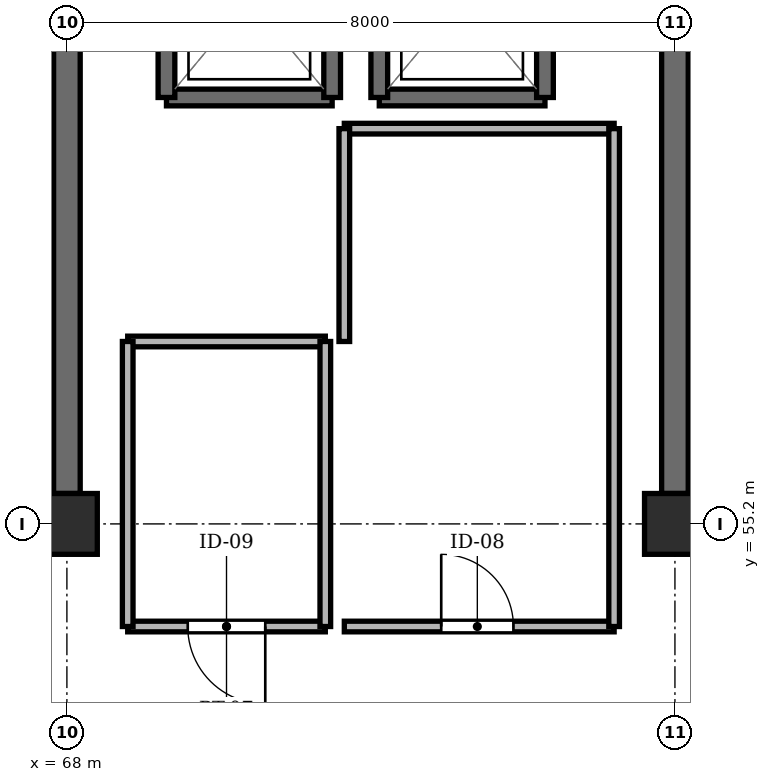
"""IFC4 building model, lengths in metres.
Left out: names, types, materials, properties, quantities, classifications, styles, units other than length and angle.
Written with IfcOpenShell. Run it as: python <this file> out.ifc"""

import sys

from ifc_helpers import new_model, si_unit, direction, frame, frame_2d, origin, origin_2d, place, context, subcontext, project, spatial, rectangle, extrude, element, fill, save


model = new_model("IFC4")
c1 = context("Model", 3, precision=1e-05, world=origin(), true_north=direction((0.0, 1.0)))
c2 = subcontext(c1, "Body", "Model", "MODEL_VIEW")
j1 = project(units=[si_unit("LENGTHUNIT", "METRE"), si_unit("PLANEANGLEUNIT", "RADIAN")], contexts=[c1])
p1 = place(None, origin())
s1 = spatial("IfcSite", under=j1, at=p1, CompositionType="ELEMENT")
p2 = place(p1, origin())
s2 = spatial("IfcBuilding", under=s1, at=p2, CompositionType="ELEMENT")
p3 = place(p2, frame((0.0, 0.0, 63.3)))
s3 = spatial("IfcBuildingStorey", under=s2, at=p3, CompositionType="ELEMENT", Elevation=63.3)
for number, where, z_axis, x_axis in (
    (1, (68.0, 55.2, -0.21), (0.0, 0.0, 1.0), (1.0, 0.0, 0.0)),
    (2, (76.0, 55.2, -0.21), (0.0, 0.0, 1.0), (1.0, 0.0, 0.0)),
):
    element("IfcColumn", number, at=place(p3, frame(where, z_axis=z_axis, x_axis=x_axis)), inside=s3, PredefinedType="COLUMN", context=c2, shape_type="SweptSolid", body=[
        extrude(rectangle(XDim=0.8, YDim=0.8, at=origin_2d()), origin(), (0.0, 0.0, 1.0), 3.22),
    ])
for number, where, z_axis, x_axis in (
    (3, (68.0, 55.6, 0.0), (0.0, 0.0, 1.0), (0.0, 1.0, 0.0)),
    (4, (76.0, 55.6, 0.0), (0.0, 0.0, 1.0), (0.0, 1.0, 0.0)),
):
    element("IfcWall", number, at=place(p3, frame(where, z_axis=z_axis, x_axis=x_axis)), inside=s3, PredefinedType="SHEAR", context=c2, shape_type="SweptSolid", body=[
        extrude(rectangle(XDim=6.5, YDim=0.35, at=frame_2d((3.25, 0.0))), origin(), (0.0, 0.0, 1.0), 3.01),
    ])
p4 = place(p3, frame((69.31, 60.81, 0.0), z_axis=(0.0, 0.0, 1.0), x_axis=(1.0, 0.0, 0.0)))
e5 = element("IfcWall", 5, at=p4, inside=s3, PredefinedType="SHEAR", context=c2, shape_type="SweptSolid", body=[
    extrude(rectangle(XDim=2.18, YDim=0.22, at=frame_2d((1.09, 0.0))), origin(), (0.0, 0.0, 1.0), 3.01),
])
for number, where, z_axis, x_axis in (
    (6, (69.31, 63.39, 0.0), (0.0, 0.0, 1.0), (0.0, -1.0, 0.0)),
    (7, (71.49, 60.81, 0.0), (0.0, 0.0, 1.0), (0.0, 1.0, 0.0)),
):
    element("IfcWall", number, at=place(p3, frame(where, z_axis=z_axis, x_axis=x_axis)), inside=s3, PredefinedType="SHEAR", context=c2, shape_type="SweptSolid", body=[
        extrude(rectangle(XDim=2.58, YDim=0.22, at=frame_2d((1.29, 0.0))), origin(), (0.0, 0.0, 1.0), 3.01),
    ])
p5 = place(p3, frame((72.11, 60.81, 0.0), z_axis=(0.0, 0.0, 1.0), x_axis=(1.0, 0.0, 0.0)))
e8 = element("IfcWall", 8, at=p5, inside=s3, PredefinedType="SHEAR", context=c2, shape_type="SweptSolid", body=[
    extrude(rectangle(XDim=2.18, YDim=0.22, at=frame_2d((1.09, 0.0))), origin(), (0.0, 0.0, 1.0), 3.01),
])
for number, where, z_axis, x_axis in (
    (9, (72.11, 63.39, 0.0), (0.0, 0.0, 1.0), (0.0, -1.0, 0.0)),
    (10, (74.29, 60.81, 0.0), (0.0, 0.0, 1.0), (0.0, 1.0, 0.0)),
):
    element("IfcWall", number, at=place(p3, frame(where, z_axis=z_axis, x_axis=x_axis)), inside=s3, PredefinedType="SHEAR", context=c2, shape_type="SweptSolid", body=[
        extrude(rectangle(XDim=2.58, YDim=0.22, at=frame_2d((1.29, 0.0))), origin(), (0.0, 0.0, 1.0), 3.01),
    ])
p6 = place(p3, frame((68.8, 53.85, 0.0), z_axis=(0.0, 0.0, 1.0), x_axis=(1.0, 0.0, 0.0)))
e11 = element("IfcWall", 11, at=p6, inside=s3, PredefinedType="PARTITIONING", context=c2, shape_type="SweptSolid", body=[
    extrude(rectangle(XDim=2.6, YDim=0.14, at=frame_2d((1.3, 0.0))), origin(), (0.0, 0.0, 1.0), 2.53),
])
p7 = place(p6, frame((0.79, 0.0, 0.0)))
e12 = element("IfcOpeningElement", 12, at=p7, cuts=e11, PredefinedType="OPENING", context=c2, shape_type="SweptSolid", body=[
    extrude(rectangle(XDim=1.02, YDim=2.1, at=frame_2d((0.51, 1.05))), frame((0.0, 0.082, 0.0), z_axis=(0.0, -1.0, 0.0), x_axis=(1.0, 0.0, 0.0)), (0.0, 0.0, 1.0), 0.164),
])
p8 = place(p3, frame((68.8, 57.6, 0.0), z_axis=(0.0, 0.0, 1.0), x_axis=(1.0, 0.0, 0.0)))
e13 = element("IfcWall", 13, at=p8, inside=s3, PredefinedType="PARTITIONING", context=c2, shape_type="SweptSolid", body=[
    extrude(rectangle(XDim=2.6, YDim=0.14, at=frame_2d((1.3, 0.0))), origin(), (0.0, 0.0, 1.0), 2.53),
])
for number, where, z_axis, x_axis in (
    (14, (68.8, 53.85, 0.0), (0.0, 0.0, 1.0), (0.0, 1.0, 0.0)),
    (15, (71.4, 53.85, 0.0), (0.0, 0.0, 1.0), (0.0, 1.0, 0.0)),
):
    element("IfcWall", number, at=place(p3, frame(where, z_axis=z_axis, x_axis=x_axis)), inside=s3, PredefinedType="PARTITIONING", context=c2, shape_type="SweptSolid", body=[
        extrude(rectangle(XDim=3.75, YDim=0.14, at=frame_2d((1.875, 0.0))), origin(), (0.0, 0.0, 1.0), 2.53),
    ])
p9 = place(p3, frame((71.65, 53.85, 0.0), z_axis=(0.0, 0.0, 1.0), x_axis=(1.0, 0.0, 0.0)))
e16 = element("IfcWall", 16, at=p9, inside=s3, PredefinedType="PARTITIONING", context=c2, shape_type="SweptSolid", body=[
    extrude(rectangle(XDim=3.55, YDim=0.14, at=frame_2d((1.775, 0.0))), origin(), (0.0, 0.0, 1.0), 2.53),
])
p10 = place(p9, frame((1.275, 0.0, 0.0)))
e17 = element("IfcOpeningElement", 17, at=p10, cuts=e16, PredefinedType="OPENING", context=c2, shape_type="SweptSolid", body=[
    extrude(rectangle(XDim=0.95, YDim=2.1, at=frame_2d((0.475, 1.05))), frame((0.0, 0.082, 0.0), z_axis=(0.0, -1.0, 0.0), x_axis=(1.0, 0.0, 0.0)), (0.0, 0.0, 1.0), 0.164),
])
p11 = place(p3, frame((71.65, 60.4, 0.0), z_axis=(0.0, 0.0, 1.0), x_axis=(1.0, 0.0, 0.0)))
e18 = element("IfcWall", 18, at=p11, inside=s3, PredefinedType="PARTITIONING", context=c2, shape_type="SweptSolid", body=[
    extrude(rectangle(XDim=3.55, YDim=0.14, at=frame_2d((1.775, 0.0))), origin(), (0.0, 0.0, 1.0), 2.53),
])
p12 = place(p3, frame((71.65, 57.6, 0.0), z_axis=(0.0, 0.0, 1.0), x_axis=(0.0, 1.0, 0.0)))
e19 = element("IfcWall", 19, at=p12, inside=s3, PredefinedType="PARTITIONING", context=c2, shape_type="SweptSolid", body=[
    extrude(rectangle(XDim=2.8, YDim=0.14, at=frame_2d((1.4, 0.0))), origin(), (0.0, 0.0, 1.0), 2.53),
])
p13 = place(p3, frame((75.2, 53.85, 0.0), z_axis=(0.0, 0.0, 1.0), x_axis=(0.0, 1.0, 0.0)))
e20 = element("IfcWall", 20, at=p13, inside=s3, PredefinedType="PARTITIONING", context=c2, shape_type="SweptSolid", body=[
    extrude(rectangle(XDim=6.55, YDim=0.14, at=frame_2d((3.275, 0.0))), origin(), (0.0, 0.0, 1.0), 2.53),
])
p14 = place(p7, frame((1.02, 0.0, 0.0), z_axis=(0.0, 0.0, 1.0), x_axis=(-1.0, 0.0, 0.0)))
e21 = element("IfcDoor", 21, at=p14, inside=s3, OperationType="SINGLE_SWING_RIGHT", PredefinedType="DOOR", context=c2, shape_type="SweptSolid", body=[
    extrude(rectangle(XDim=1.02, YDim=2.1, at=frame_2d((0.51, 1.05))), frame((0.0, 0.025, 0.0), z_axis=(0.0, -1.0, 0.0), x_axis=(1.0, 0.0, 0.0)), (0.0, 0.0, 1.0), 0.05),
])
fill(e12, e21)
p15 = place(p10, origin())
e22 = element("IfcDoor", 22, at=p15, inside=s3, OperationType="SINGLE_SWING_LEFT", PredefinedType="DOOR", context=c2, shape_type="SweptSolid", body=[
    extrude(rectangle(XDim=0.95, YDim=2.1, at=frame_2d((0.475, 1.05))), frame((0.0, 0.025, 0.0), z_axis=(0.0, -1.0, 0.0), x_axis=(1.0, 0.0, 0.0)), (0.0, 0.0, 1.0), 0.05),
])
fill(e17, e22)
save(model, sys.argv[1])
